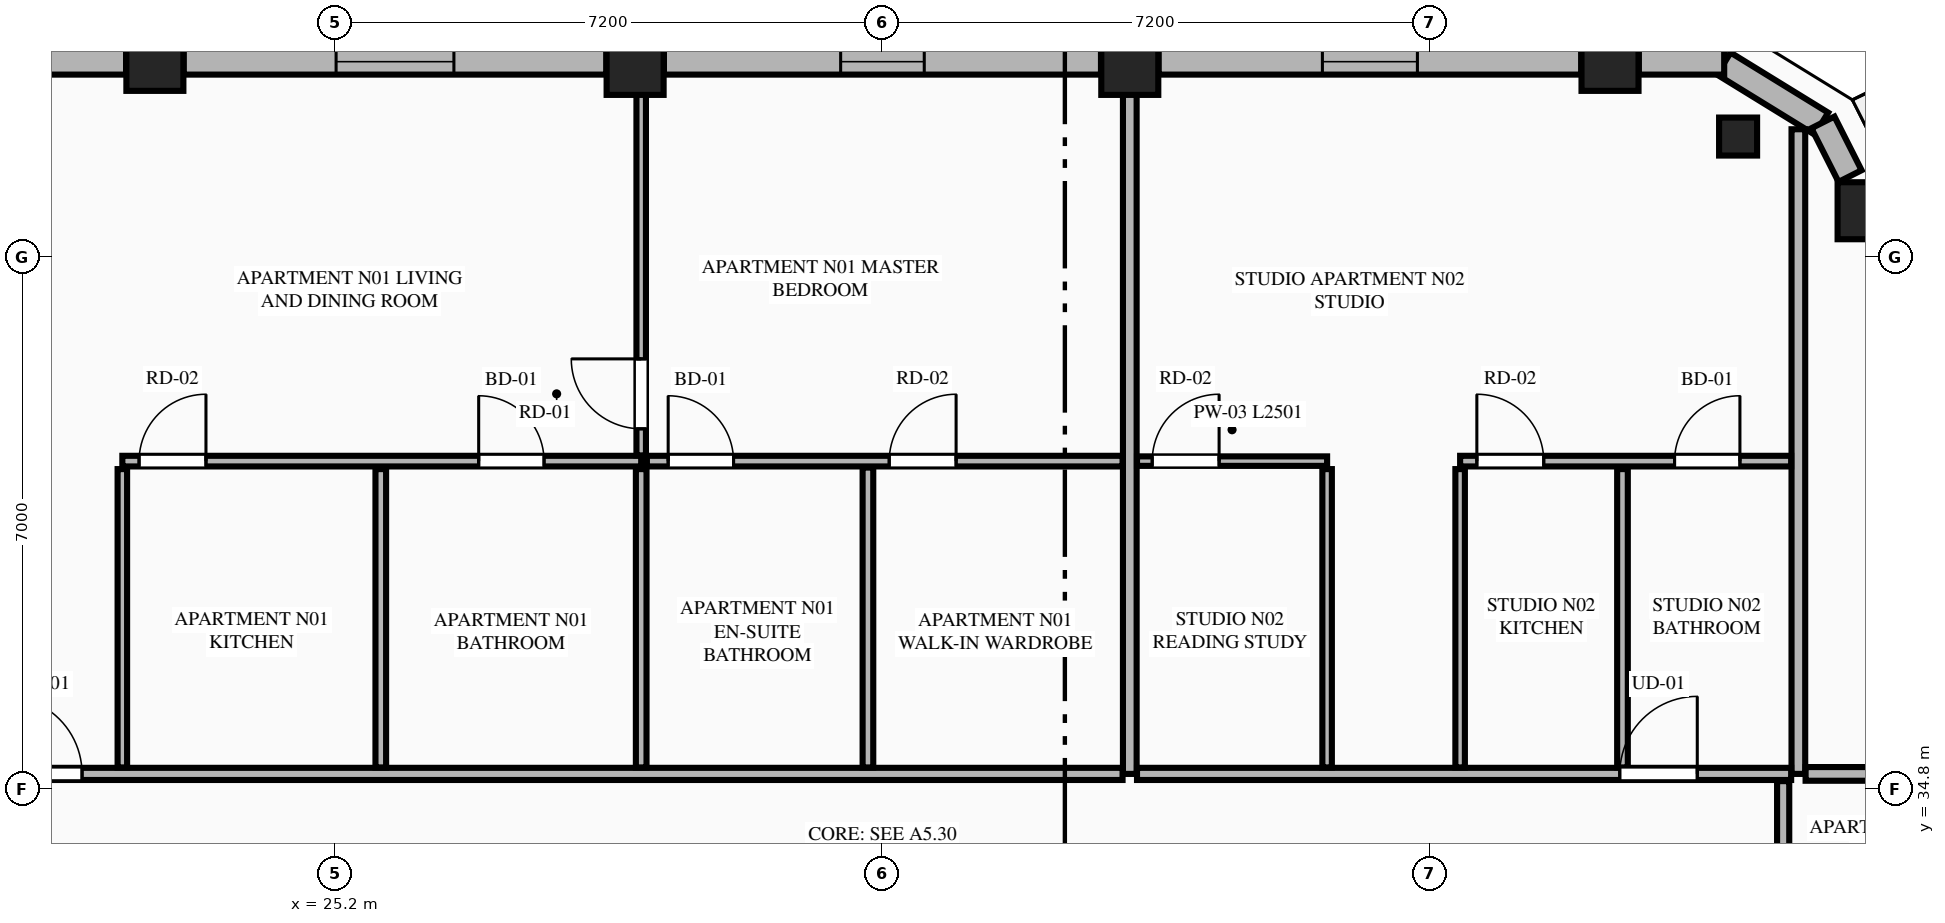
"""IFC4 building model, lengths in metres.
Left out: names, types, materials, properties, quantities, classifications, styles, units other than length and angle.
Written with IfcOpenShell. Run it as: python <this file> out.ifc"""

import sys

from ifc_helpers import new_model, si_unit, direction, frame, frame_2d, origin, origin_2d, place, context, subcontext, project, spatial, rectangle, extrude, element, fill, save


model = new_model("IFC4")
c1 = context("Model", 3, precision=1e-05, world=origin(), true_north=direction((0.0, 1.0)))
c2 = subcontext(c1, "Body", "Model", "MODEL_VIEW")
j1 = project(units=[si_unit("LENGTHUNIT", "METRE"), si_unit("PLANEANGLEUNIT", "RADIAN")], contexts=[c1])
p1 = place(None, origin())
s1 = spatial("IfcSite", under=j1, at=p1, CompositionType="ELEMENT")
p2 = place(p1, origin())
s2 = spatial("IfcBuilding", under=s1, at=p2, CompositionType="ELEMENT")
p3 = place(p2, frame((0.0, 0.0, 256.2)))
s3 = spatial("IfcBuildingStorey", under=s2, at=p3, CompositionType="ELEMENT", Elevation=256.2)
for number, where, z_axis, x_axis in (
    (1, (45.341, 42.409, 0.0), (0.0, 0.0, 1.0), (1.0, 0.0, 0.0)),
    (2, (41.972, 44.361, 0.0), (0.0, 0.0, 1.0), (1.0, 0.0, 0.0)),
    (3, (35.654, 44.308, 0.0), (0.0, 0.0, 1.0), (1.0, 0.0, 0.0)),
    (4, (29.146, 44.308, 0.0), (0.0, 0.0, 1.0), (1.0, 0.0, 0.0)),
    (5, (22.828, 44.361, 0.0), (0.0, 0.0, 1.0), (1.0, 0.0, 0.0)),
):
    element("IfcColumn", number, at=place(p3, frame(where, z_axis=z_axis, x_axis=x_axis)), inside=s3, PredefinedType="COLUMN", context=c2, shape_type="SweptSolid", body=[
        extrude(rectangle(XDim=0.75, YDim=0.75, at=origin_2d()), origin(), (0.0, 0.0, 1.0), 3.65),
    ])
p4 = place(p3, frame((43.657, 43.385, 0.0), z_axis=(0.0, 0.0, 1.0), x_axis=(-0.865256437757, 0.501329529272, 0.0)))
e6 = element("IfcColumn", 6, at=p4, inside=s3, PredefinedType="PILASTER", context=c2, shape_type="SweptSolid", body=[
    extrude(rectangle(XDim=0.5, YDim=0.35, at=origin_2d()), origin(), (0.0, 0.0, 1.0), 3.65),
])
p5 = place(p3, frame((44.753, 43.555, 0.0), z_axis=(0.0, 0.0, 1.0), x_axis=(-0.851680557619, 0.52406128246, 0.0)))
e7 = element("IfcWall", 7, at=p5, inside=s3, PredefinedType="STANDARD", context=c2, shape_type="SweptSolid", body=[
    extrude(rectangle(XDim=1.508, YDim=0.34, at=frame_2d((0.754, 0.0))), origin(), (0.0, 0.0, 1.0), 3.45),
])
p6 = place(p3, frame((45.13, 42.865, 0.0), z_axis=(0.0, 0.0, 1.0), x_axis=(-0.451159191899, 0.892443490404, 0.0)))
e8 = element("IfcWall", 8, at=p6, inside=s3, PredefinedType="STANDARD", context=c2, shape_type="SweptSolid", body=[
    extrude(rectangle(XDim=0.791, YDim=0.34, at=frame_2d((0.396, 0.0))), origin(), (0.0, 0.0, 1.0), 3.45),
])
p7 = place(p3, frame((43.474, 44.37, 0.0), z_axis=(0.0, 0.0, 1.0), x_axis=(-1.0, 0.0, 0.0)))
e9 = element("IfcWall", 9, at=p7, inside=s3, PredefinedType="STANDARD", context=c2, shape_type="SweptSolid", body=[
    extrude(rectangle(XDim=1.123, YDim=0.34, at=frame_2d((0.562, 0.0))), origin(), (0.0, 0.0, 1.0), 3.45),
])
p8 = place(p3, frame((41.593, 44.37, 0.0), z_axis=(0.0, 0.0, 1.0), x_axis=(-1.0, 0.0, 0.0)))
e10 = element("IfcWall", 10, at=p8, inside=s3, PredefinedType="STANDARD", context=c2, shape_type="SweptSolid", body=[
    extrude(rectangle(XDim=5.56, YDim=0.34, at=frame_2d((2.78, 0.0))), origin(), (0.0, 0.0, 1.0), 2.983),
])
p9 = place(p8, frame((2.155, 0.0, 0.75)))
e11 = element("IfcOpeningElement", 11, at=p9, cuts=e10, PredefinedType="OPENING", context=c2, shape_type="SweptSolid", body=[
    extrude(rectangle(XDim=1.25, YDim=1.95, at=frame_2d((0.625, 0.975))), frame((0.0, 0.18, 0.0), z_axis=(0.0, -1.0, 0.0), x_axis=(1.0, 0.0, 0.0)), (0.0, 0.0, 1.0), 0.36),
])
p10 = place(p3, frame((35.275, 44.37, 0.0), z_axis=(0.0, 0.0, 1.0), x_axis=(-1.0, 0.0, 0.0)))
e12 = element("IfcWall", 12, at=p10, inside=s3, PredefinedType="STANDARD", context=c2, shape_type="SweptSolid", body=[
    extrude(rectangle(XDim=5.75, YDim=0.34, at=frame_2d((2.875, 0.0))), origin(), (0.0, 0.0, 1.0), 2.983),
])
p11 = place(p10, frame((2.325, 0.0, 0.75)))
e13 = element("IfcOpeningElement", 13, at=p11, cuts=e12, PredefinedType="OPENING", context=c2, shape_type="SweptSolid", body=[
    extrude(rectangle(XDim=1.1, YDim=2.0, at=frame_2d((0.55, 1.0))), frame((0.0, 0.18, 0.0), z_axis=(0.0, -1.0, 0.0), x_axis=(1.0, 0.0, 0.0)), (0.0, 0.0, 1.0), 0.36),
])
p12 = place(p3, frame((28.767, 44.37, 0.0), z_axis=(0.0, 0.0, 1.0), x_axis=(-1.0, 0.0, 0.0)))
e14 = element("IfcWall", 14, at=p12, inside=s3, PredefinedType="STANDARD", context=c2, shape_type="SweptSolid", body=[
    extrude(rectangle(XDim=5.56, YDim=0.34, at=frame_2d((2.78, 0.0))), origin(), (0.0, 0.0, 1.0), 2.983),
])
p13 = place(p12, frame((2.005, 0.0, 0.75)))
e15 = element("IfcOpeningElement", 15, at=p13, cuts=e14, PredefinedType="OPENING", context=c2, shape_type="SweptSolid", body=[
    extrude(rectangle(XDim=1.55, YDim=2.05, at=frame_2d((0.775, 1.025))), frame((0.0, 0.18, 0.0), z_axis=(0.0, -1.0, 0.0), x_axis=(1.0, 0.0, 0.0)), (0.0, 0.0, 1.0), 0.36),
])
p14 = place(p3, frame((22.449, 44.37, 0.0), z_axis=(0.0, 0.0, 1.0), x_axis=(-1.0, 0.0, 0.0)))
e16 = element("IfcWall", 16, at=p14, inside=s3, PredefinedType="STANDARD", context=c2, shape_type="SweptSolid", body=[
    extrude(rectangle(XDim=1.123, YDim=0.34, at=frame_2d((0.562, 0.0))), origin(), (0.0, 0.0, 1.0), 3.45),
])
p15 = place(p3, frame((35.654, 35.0, 0.0), z_axis=(0.0, 0.0, 1.0), x_axis=(0.0, 1.0, 0.0)))
e17 = element("IfcWall", 17, at=p15, inside=s3, PredefinedType="PARTITIONING", context=c2, shape_type="SweptSolid", body=[
    extrude(rectangle(XDim=9.195, YDim=0.18, at=frame_2d((4.598, 0.0))), origin(), (0.0, 0.0, 1.0), 2.907),
])
p16 = place(p3, frame((44.45, 35.0, 0.0), z_axis=(0.0, 0.0, 1.0), x_axis=(0.0, 1.0, 0.0)))
e18 = element("IfcWall", 18, at=p16, inside=s3, PredefinedType="PARTITIONING", context=c2, shape_type="SweptSolid", body=[
    extrude(rectangle(XDim=8.481, YDim=0.18, at=frame_2d((4.24, 0.0))), origin(), (0.0, 0.0, 1.0), 3.45),
])
p17 = place(p3, frame((20.445, 35.0, 0.0), z_axis=(0.0, 0.0, 1.0), x_axis=(1.0, 0.0, 0.0)))
e19 = element("IfcWall", 19, at=p17, inside=s3, PredefinedType="PARTITIONING", context=c2, shape_type="SweptSolid", body=[
    extrude(rectangle(XDim=15.114, YDim=0.16, at=frame_2d((7.557, 0.0))), origin(), (0.0, 0.0, 1.0), 3.45),
])
p18 = place(p17, frame((0.405, 0.0, 0.0)))
e20 = element("IfcOpeningElement", 20, at=p18, cuts=e19, PredefinedType="OPENING", context=c2, shape_type="SweptSolid", body=[
    extrude(rectangle(XDim=1.02, YDim=2.25, at=frame_2d((0.51, 1.125))), frame((0.0, 0.09, 0.0), z_axis=(0.0, -1.0, 0.0), x_axis=(1.0, 0.0, 0.0)), (0.0, 0.0, 1.0), 0.18),
])
p19 = place(p3, frame((22.4, 35.085, 0.0), z_axis=(0.0, 0.0, 1.0), x_axis=(0.0, 1.0, 0.0)))
e21 = element("IfcWall", 21, at=p19, inside=s3, PredefinedType="PARTITIONING", context=c2, shape_type="SweptSolid", body=[
    extrude(rectangle(XDim=3.925, YDim=0.125, at=frame_2d((1.962, 0.0))), origin(), (0.0, 0.0, 1.0), 3.45),
])
p20 = place(p3, frame((22.4, 39.115, 0.0), z_axis=(0.0, 0.0, 1.0), x_axis=(1.0, 0.0, 0.0)))
e22 = element("IfcWall", 22, at=p20, inside=s3, PredefinedType="PLUMBINGWALL", context=c2, shape_type="SweptSolid", body=[
    extrude(rectangle(XDim=6.826, YDim=0.14, at=frame_2d((3.413, 0.0))), origin(), (0.0, 0.0, 1.0), 3.45),
])
p21 = place(p20, frame((4.688, 0.0, 0.0)))
e23 = element("IfcOpeningElement", 23, at=p21, cuts=e22, PredefinedType="OPENING", context=c2, shape_type="SweptSolid", body=[
    extrude(rectangle(XDim=0.86, YDim=2.1, at=frame_2d((0.43, 1.05))), frame((0.0, 0.08, 0.0), z_axis=(0.0, -1.0, 0.0), x_axis=(1.0, 0.0, 0.0)), (0.0, 0.0, 1.0), 0.16),
])
p22 = place(p20, frame((0.22, 0.0, 0.0)))
e24 = element("IfcOpeningElement", 24, at=p22, cuts=e22, PredefinedType="OPENING", context=c2, shape_type="SweptSolid", body=[
    extrude(rectangle(XDim=0.88, YDim=2.15, at=frame_2d((0.44, 1.075))), frame((0.0, 0.08, 0.0), z_axis=(0.0, -1.0, 0.0), x_axis=(1.0, 0.0, 0.0)), (0.0, 0.0, 1.0), 0.16),
])
p23 = place(p3, frame((29.301, 39.115, 0.0), z_axis=(0.0, 0.0, 1.0), x_axis=(1.0, 0.0, 0.0)))
e25 = element("IfcWall", 25, at=p23, inside=s3, PredefinedType="PLUMBINGWALL", context=c2, shape_type="SweptSolid", body=[
    extrude(rectangle(XDim=6.258, YDim=0.14, at=frame_2d((3.129, 0.0))), origin(), (0.0, 0.0, 1.0), 3.45),
])
p24 = place(p23, frame((0.28, 0.0, 0.0)))
e26 = element("IfcOpeningElement", 26, at=p24, cuts=e25, PredefinedType="OPENING", context=c2, shape_type="SweptSolid", body=[
    extrude(rectangle(XDim=0.86, YDim=2.1, at=frame_2d((0.43, 1.05))), frame((0.0, 0.08, 0.0), z_axis=(0.0, -1.0, 0.0), x_axis=(1.0, 0.0, 0.0)), (0.0, 0.0, 1.0), 0.16),
])
p25 = place(p23, frame((3.188, 0.0, 0.0)))
e27 = element("IfcOpeningElement", 27, at=p25, cuts=e25, PredefinedType="OPENING", context=c2, shape_type="SweptSolid", body=[
    extrude(rectangle(XDim=0.88, YDim=2.15, at=frame_2d((0.44, 1.075))), frame((0.0, 0.08, 0.0), z_axis=(0.0, -1.0, 0.0), x_axis=(1.0, 0.0, 0.0)), (0.0, 0.0, 1.0), 0.16),
])
p26 = place(p3, frame((25.8, 35.085, 0.0), z_axis=(0.0, 0.0, 1.0), x_axis=(0.0, 1.0, 0.0)))
e28 = element("IfcWall", 28, at=p26, inside=s3, PredefinedType="PLUMBINGWALL", context=c2, shape_type="SweptSolid", body=[
    extrude(rectangle(XDim=3.925, YDim=0.14, at=frame_2d((1.962, 0.0))), origin(), (0.0, 0.0, 1.0), 3.45),
])
p27 = place(p3, frame((29.226, 35.085, 0.0), z_axis=(0.0, 0.0, 1.0), x_axis=(0.0, 1.0, 0.0)))
e29 = element("IfcWall", 29, at=p27, inside=s3, PredefinedType="PLUMBINGWALL", context=c2, shape_type="SweptSolid", body=[
    extrude(rectangle(XDim=3.925, YDim=0.14, at=frame_2d((1.962, 0.0))), origin(), (0.0, 0.0, 1.0), 2.907),
])
p28 = place(p3, frame((29.226, 39.19, 0.0), z_axis=(0.0, 0.0, 1.0), x_axis=(0.0, 1.0, 0.0)))
e30 = element("IfcWall", 30, at=p28, inside=s3, PredefinedType="PARTITIONING", context=c2, shape_type="SweptSolid", body=[
    extrude(rectangle(XDim=5.095, YDim=0.125, at=frame_2d((2.547, 0.0))), origin(), (0.0, 0.0, 1.0), 2.907),
])
p29 = place(p28, frame((0.35, 0.0, 0.0)))
e31 = element("IfcOpeningElement", 31, at=p29, cuts=e30, PredefinedType="OPENING", context=c2, shape_type="SweptSolid", body=[
    extrude(rectangle(XDim=0.92, YDim=2.15, at=frame_2d((0.46, 1.075))), frame((0.0, 0.073, 0.0), z_axis=(0.0, -1.0, 0.0), x_axis=(1.0, 0.0, 0.0)), (0.0, 0.0, 1.0), 0.145),
])
p30 = place(p3, frame((32.209, 35.085, 0.0), z_axis=(0.0, 0.0, 1.0), x_axis=(0.0, 1.0, 0.0)))
e32 = element("IfcWall", 32, at=p30, inside=s3, PredefinedType="PLUMBINGWALL", context=c2, shape_type="SweptSolid", body=[
    extrude(rectangle(XDim=3.945, YDim=0.14, at=frame_2d((1.973, 0.0))), origin(), (0.0, 0.0, 1.0), 3.45),
])
p31 = place(p3, frame((35.749, 35.0, 0.0), z_axis=(0.0, 0.0, 1.0), x_axis=(1.0, 0.0, 0.0)))
e33 = element("IfcWall", 33, at=p31, inside=s3, PredefinedType="PARTITIONING", context=c2, shape_type="SweptSolid", body=[
    extrude(rectangle(XDim=8.606, YDim=0.16, at=frame_2d((4.303, 0.0))), origin(), (0.0, 0.0, 1.0), 3.45),
])
p32 = place(p31, frame((6.351, 0.0, 0.0)))
e34 = element("IfcOpeningElement", 34, at=p32, cuts=e33, PredefinedType="OPENING", context=c2, shape_type="SweptSolid", body=[
    extrude(rectangle(XDim=1.02, YDim=2.25, at=frame_2d((0.51, 1.125))), frame((0.0, 0.09, 0.0), z_axis=(0.0, -1.0, 0.0), x_axis=(1.0, 0.0, 0.0)), (0.0, 0.0, 1.0), 0.18),
])
p33 = place(p3, frame((40.0, 35.085, 0.0), z_axis=(0.0, 0.0, 1.0), x_axis=(0.0, 1.0, 0.0)))
e35 = element("IfcWall", 35, at=p33, inside=s3, PredefinedType="PARTITIONING", context=c2, shape_type="SweptSolid", body=[
    extrude(rectangle(XDim=3.925, YDim=0.125, at=frame_2d((1.962, 0.0))), origin(), (0.0, 0.0, 1.0), 3.45),
])
p34 = place(p3, frame((40.0, 39.115, 0.0), z_axis=(0.0, 0.0, 1.0), x_axis=(1.0, 0.0, 0.0)))
e36 = element("IfcWall", 36, at=p34, inside=s3, PredefinedType="PLUMBINGWALL", context=c2, shape_type="SweptSolid", body=[
    extrude(rectangle(XDim=4.355, YDim=0.14, at=frame_2d((2.177, 0.0))), origin(), (0.0, 0.0, 1.0), 3.45),
])
p35 = place(p34, frame((2.821, 0.0, 0.0)))
e37 = element("IfcOpeningElement", 37, at=p35, cuts=e36, PredefinedType="OPENING", context=c2, shape_type="SweptSolid", body=[
    extrude(rectangle(XDim=0.86, YDim=2.1, at=frame_2d((0.43, 1.05))), frame((0.0, 0.08, 0.0), z_axis=(0.0, -1.0, 0.0), x_axis=(1.0, 0.0, 0.0)), (0.0, 0.0, 1.0), 0.16),
])
p36 = place(p34, frame((0.22, 0.0, 0.0)))
e38 = element("IfcOpeningElement", 38, at=p36, cuts=e36, PredefinedType="OPENING", context=c2, shape_type="SweptSolid", body=[
    extrude(rectangle(XDim=0.88, YDim=2.15, at=frame_2d((0.44, 1.075))), frame((0.0, 0.08, 0.0), z_axis=(0.0, -1.0, 0.0), x_axis=(1.0, 0.0, 0.0)), (0.0, 0.0, 1.0), 0.16),
])
p37 = place(p3, frame((42.136, 35.085, 0.0), z_axis=(0.0, 0.0, 1.0), x_axis=(0.0, 1.0, 0.0)))
e39 = element("IfcWall", 39, at=p37, inside=s3, PredefinedType="PLUMBINGWALL", context=c2, shape_type="SweptSolid", body=[
    extrude(rectangle(XDim=3.925, YDim=0.14, at=frame_2d((1.962, 0.0))), origin(), (0.0, 0.0, 1.0), 3.45),
])
p38 = place(p3, frame((38.25, 35.085, 0.0), z_axis=(0.0, 0.0, 1.0), x_axis=(0.0, 1.0, 0.0)))
e40 = element("IfcWall", 40, at=p38, inside=s3, PredefinedType="PARTITIONING", context=c2, shape_type="SweptSolid", body=[
    extrude(rectangle(XDim=3.925, YDim=0.125, at=frame_2d((1.962, 0.0))), origin(), (0.0, 0.0, 1.0), 3.45),
])
p39 = place(p3, frame((35.749, 39.115, 0.0), z_axis=(0.0, 0.0, 1.0), x_axis=(1.0, 0.0, 0.0)))
e41 = element("IfcWall", 41, at=p39, inside=s3, PredefinedType="PARTITIONING", context=c2, shape_type="SweptSolid", body=[
    extrude(rectangle(XDim=2.501, YDim=0.125, at=frame_2d((1.25, 0.0))), origin(), (0.0, 0.0, 1.0), 3.45),
])
p40 = place(p39, frame((0.2, 0.0, 0.0)))
e42 = element("IfcOpeningElement", 42, at=p40, cuts=e41, PredefinedType="OPENING", context=c2, shape_type="SweptSolid", body=[
    extrude(rectangle(XDim=0.88, YDim=2.15, at=frame_2d((0.44, 1.075))), frame((0.0, 0.073, 0.0), z_axis=(0.0, -1.0, 0.0), x_axis=(1.0, 0.0, 0.0)), (0.0, 0.0, 1.0), 0.145),
])
p41 = place(p3, frame((44.545, 35.0, 0.0), z_axis=(0.0, 0.0, 1.0), x_axis=(1.0, 0.0, 0.0)))
e43 = element("IfcWall", 43, at=p41, inside=s3, PredefinedType="PARTITIONING", context=c2, shape_type="SweptSolid", body=[
    extrude(rectangle(XDim=4.322, YDim=0.18, at=frame_2d((2.161, 0.0))), origin(), (0.0, 0.0, 1.0), 3.45),
])
p42 = place(p3, frame((44.25, 26.539, 0.0), z_axis=(0.0, 0.0, 1.0), x_axis=(0.0, 1.0, 0.0)))
e44 = element("IfcWall", 44, at=p42, inside=s3, PredefinedType="PARTITIONING", context=c2, shape_type="SweptSolid", body=[
    extrude(rectangle(XDim=8.366, YDim=0.16, at=frame_2d((4.183, 0.0))), origin(), (0.0, 0.0, 1.0), 3.137),
])
p43 = place(p42, frame((0.45, 0.0, 0.0)))
e45 = element("IfcOpeningElement", 45, at=p43, cuts=e44, PredefinedType="OPENING", context=c2, shape_type="SweptSolid", body=[
    extrude(rectangle(XDim=1.02, YDim=2.25, at=frame_2d((0.51, 1.125))), frame((0.0, 0.09, 0.0), z_axis=(0.0, -1.0, 0.0), x_axis=(1.0, 0.0, 0.0)), (0.0, 0.0, 1.0), 0.18),
])
p44 = place(p9, origin())
e46 = element("IfcWindow", 46, at=p44, inside=s3, PartitioningType="SINGLE_PANEL", PredefinedType="WINDOW", context=c2, shape_type="SweptSolid", body=[
    extrude(rectangle(XDim=1.25, YDim=1.95, at=frame_2d((0.625, 0.975))), frame((0.0, 0.03, 0.0), z_axis=(0.0, -1.0, 0.0), x_axis=(1.0, 0.0, 0.0)), (0.0, 0.0, 1.0), 0.06),
])
fill(e11, e46)
p45 = place(p11, origin())
e47 = element("IfcWindow", 47, at=p45, inside=s3, PartitioningType="SINGLE_PANEL", PredefinedType="WINDOW", context=c2, shape_type="SweptSolid", body=[
    extrude(rectangle(XDim=1.1, YDim=2.0, at=frame_2d((0.55, 1.0))), frame((0.0, 0.03, 0.0), z_axis=(0.0, -1.0, 0.0), x_axis=(1.0, 0.0, 0.0)), (0.0, 0.0, 1.0), 0.06),
])
fill(e13, e47)
p46 = place(p13, origin())
e48 = element("IfcWindow", 48, at=p46, inside=s3, PartitioningType="SINGLE_PANEL", PredefinedType="WINDOW", context=c2, shape_type="SweptSolid", body=[
    extrude(rectangle(XDim=1.55, YDim=2.05, at=frame_2d((0.775, 1.025))), frame((0.0, 0.03, 0.0), z_axis=(0.0, -1.0, 0.0), x_axis=(1.0, 0.0, 0.0)), (0.0, 0.0, 1.0), 0.06),
])
fill(e15, e48)
p47 = place(p21, origin())
e49 = element("IfcDoor", 49, at=p47, inside=s3, OperationType="SINGLE_SWING_LEFT", PredefinedType="DOOR", context=c2, shape_type="SweptSolid", body=[
    extrude(rectangle(XDim=0.86, YDim=2.1, at=frame_2d((0.43, 1.05))), frame((0.0, 0.025, 0.0), z_axis=(0.0, -1.0, 0.0), x_axis=(1.0, 0.0, 0.0)), (0.0, 0.0, 1.0), 0.05),
])
fill(e23, e49)
p48 = place(p24, origin())
e50 = element("IfcDoor", 50, at=p48, inside=s3, OperationType="SINGLE_SWING_LEFT", PredefinedType="DOOR", context=c2, shape_type="SweptSolid", body=[
    extrude(rectangle(XDim=0.86, YDim=2.1, at=frame_2d((0.43, 1.05))), frame((0.0, 0.025, 0.0), z_axis=(0.0, -1.0, 0.0), x_axis=(1.0, 0.0, 0.0)), (0.0, 0.0, 1.0), 0.05),
])
fill(e26, e50)
p49 = place(p25, origin())
e51 = element("IfcDoor", 51, at=p49, inside=s3, OperationType="SINGLE_SWING_RIGHT", PredefinedType="DOOR", context=c2, shape_type="SweptSolid", body=[
    extrude(rectangle(XDim=0.88, YDim=2.15, at=frame_2d((0.44, 1.075))), frame((0.0, 0.025, 0.0), z_axis=(0.0, -1.0, 0.0), x_axis=(1.0, 0.0, 0.0)), (0.0, 0.0, 1.0), 0.05),
])
fill(e27, e51)
p50 = place(p18, origin())
e52 = element("IfcDoor", 52, at=p50, inside=s3, OperationType="SINGLE_SWING_LEFT", PredefinedType="DOOR", context=c2, shape_type="SweptSolid", body=[
    extrude(rectangle(XDim=1.02, YDim=2.25, at=frame_2d((0.51, 1.125))), frame((0.0, 0.025, 0.0), z_axis=(0.0, -1.0, 0.0), x_axis=(1.0, 0.0, 0.0)), (0.0, 0.0, 1.0), 0.05),
])
fill(e20, e52)
p51 = place(p22, origin())
e53 = element("IfcDoor", 53, at=p51, inside=s3, OperationType="SINGLE_SWING_RIGHT", PredefinedType="DOOR", context=c2, shape_type="SweptSolid", body=[
    extrude(rectangle(XDim=0.88, YDim=2.15, at=frame_2d((0.44, 1.075))), frame((0.0, 0.025, 0.0), z_axis=(0.0, -1.0, 0.0), x_axis=(1.0, 0.0, 0.0)), (0.0, 0.0, 1.0), 0.05),
])
fill(e24, e53)
p52 = place(p29, origin())
e54 = element("IfcDoor", 54, at=p52, inside=s3, OperationType="SINGLE_SWING_RIGHT", PredefinedType="DOOR", context=c2, shape_type="SweptSolid", body=[
    extrude(rectangle(XDim=0.92, YDim=2.15, at=frame_2d((0.46, 1.075))), frame((0.0, 0.025, 0.0), z_axis=(0.0, -1.0, 0.0), x_axis=(1.0, 0.0, 0.0)), (0.0, 0.0, 1.0), 0.05),
])
fill(e31, e54)
p53 = place(p40, origin())
e55 = element("IfcDoor", 55, at=p53, inside=s3, OperationType="SINGLE_SWING_RIGHT", PredefinedType="DOOR", context=c2, shape_type="SweptSolid", body=[
    extrude(rectangle(XDim=0.88, YDim=2.15, at=frame_2d((0.44, 1.075))), frame((0.0, 0.025, 0.0), z_axis=(0.0, -1.0, 0.0), x_axis=(1.0, 0.0, 0.0)), (0.0, 0.0, 1.0), 0.05),
])
fill(e42, e55)
p54 = place(p35, origin())
e56 = element("IfcDoor", 56, at=p54, inside=s3, OperationType="SINGLE_SWING_RIGHT", PredefinedType="DOOR", context=c2, shape_type="SweptSolid", body=[
    extrude(rectangle(XDim=0.86, YDim=2.1, at=frame_2d((0.43, 1.05))), frame((0.0, 0.025, 0.0), z_axis=(0.0, -1.0, 0.0), x_axis=(1.0, 0.0, 0.0)), (0.0, 0.0, 1.0), 0.05),
])
fill(e37, e56)
p55 = place(p32, origin())
e57 = element("IfcDoor", 57, at=p55, inside=s3, OperationType="SINGLE_SWING_RIGHT", PredefinedType="DOOR", context=c2, shape_type="SweptSolid", body=[
    extrude(rectangle(XDim=1.02, YDim=2.25, at=frame_2d((0.51, 1.125))), frame((0.0, 0.025, 0.0), z_axis=(0.0, -1.0, 0.0), x_axis=(1.0, 0.0, 0.0)), (0.0, 0.0, 1.0), 0.05),
])
fill(e34, e57)
p56 = place(p36, origin())
e58 = element("IfcDoor", 58, at=p56, inside=s3, OperationType="SINGLE_SWING_LEFT", PredefinedType="DOOR", context=c2, shape_type="SweptSolid", body=[
    extrude(rectangle(XDim=0.88, YDim=2.15, at=frame_2d((0.44, 1.075))), frame((0.0, 0.025, 0.0), z_axis=(0.0, -1.0, 0.0), x_axis=(1.0, 0.0, 0.0)), (0.0, 0.0, 1.0), 0.05),
])
fill(e38, e58)
save(model, sys.argv[1])
